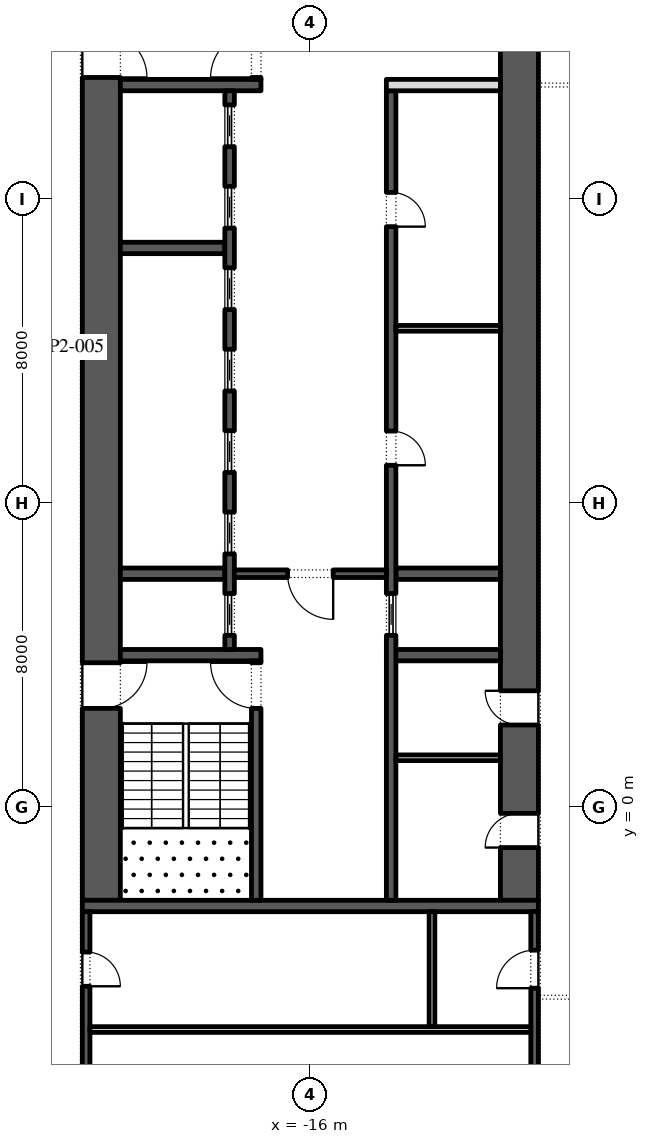
"""IFC4 building model, lengths in metres.
Left out: names, types, materials, properties, quantities, classifications, styles, units other than length and angle.
Written with IfcOpenShell. Run it as: python <this file> out.ifc"""

import sys

from ifc_helpers import new_model, si_unit, direction, frame, frame_2d, origin, place, context, subcontext, project, spatial, rectangle, extrude, element, fill, save


model = new_model("IFC4")
c1 = context("Model", 3, precision=1e-05, world=origin(), true_north=direction((0.0, 1.0)))
c2 = subcontext(c1, "Body", "Model", "MODEL_VIEW")
j1 = project(units=[si_unit("LENGTHUNIT", "METRE"), si_unit("PLANEANGLEUNIT", "RADIAN")], contexts=[c1])
p1 = place(None, origin())
s1 = spatial("IfcSite", under=j1, at=p1, CompositionType="ELEMENT")
p2 = place(p1, origin())
s2 = spatial("IfcBuilding", under=s1, at=p2, CompositionType="ELEMENT")
p3 = place(p2, frame((0.0, 0.0, 81.6)))
s3 = spatial("IfcBuildingStorey", under=s2, at=p3, CompositionType="ELEMENT", Elevation=81.6)
p4 = place(p3, frame((-21.5, -2.45, 0.0), z_axis=(0.0, 0.0, 1.0), x_axis=(0.0, 1.0, 0.0)))
e1 = element("IfcWall", 1, at=p4, inside=s3, PredefinedType="SHEAR", context=c2, shape_type="SweptSolid", body=[
    extrude(rectangle(XDim=27.9, YDim=1.0, at=frame_2d((13.95, 0.0))), origin(), (0.0, 0.0, 1.0), 4.0),
])
p5 = place(p4, frame((5.05, 0.0, 0.0)))
e2 = element("IfcOpeningElement", 2, at=p5, cuts=e1, PredefinedType="OPENING", context=c2, shape_type="SweptSolid", body=[
    extrude(rectangle(XDim=1.2, YDim=2.1, at=frame_2d((0.6, 1.05))), frame((0.0, 0.51, 0.0), z_axis=(0.0, -1.0, 0.0), x_axis=(1.0, 0.0, 0.0)), (0.0, 0.0, 1.0), 1.02),
])
p6 = place(p4, frame((21.65, 0.0, 0.0)))
e3 = element("IfcOpeningElement", 3, at=p6, cuts=e1, PredefinedType="OPENING", context=c2, shape_type="SweptSolid", body=[
    extrude(rectangle(XDim=1.2, YDim=2.1, at=frame_2d((0.6, 1.05))), frame((0.0, 0.51, 0.0), z_axis=(0.0, -1.0, 0.0), x_axis=(1.0, 0.0, 0.0)), (0.0, 0.0, 1.0), 1.02),
])
p7 = place(p3, frame((-10.5, -2.45, 0.0), z_axis=(0.0, 0.0, 1.0), x_axis=(0.0, 1.0, 0.0)))
e4 = element("IfcWall", 4, at=p7, inside=s3, PredefinedType="SHEAR", context=c2, shape_type="SweptSolid", body=[
    extrude(rectangle(XDim=27.9, YDim=1.0, at=frame_2d((13.95, 0.0))), origin(), (0.0, 0.0, 1.0), 4.0),
])
p8 = place(p7, frame((23.65, 0.0, 0.0)))
e5 = element("IfcOpeningElement", 5, at=p8, cuts=e4, PredefinedType="OPENING", context=c2, shape_type="SweptSolid", body=[
    extrude(rectangle(XDim=2.4, YDim=2.1, at=frame_2d((1.2, 1.05))), frame((0.0, 0.51, 0.0), z_axis=(0.0, -1.0, 0.0), x_axis=(1.0, 0.0, 0.0)), (0.0, 0.0, 1.0), 1.02),
])
p9 = place(p7, frame((1.387, 0.0, 0.0)))
e6 = element("IfcOpeningElement", 6, at=p9, cuts=e4, PredefinedType="OPENING", context=c2, shape_type="SweptSolid", body=[
    extrude(rectangle(XDim=0.9, YDim=2.1, at=frame_2d((0.45, 1.05))), frame((0.0, 0.51, 0.0), z_axis=(0.0, -1.0, 0.0), x_axis=(1.0, 0.0, 0.0)), (0.0, 0.0, 1.0), 1.02),
])
p10 = place(p7, frame((4.613, 0.0, 0.0)))
e7 = element("IfcOpeningElement", 7, at=p10, cuts=e4, PredefinedType="OPENING", context=c2, shape_type="SweptSolid", body=[
    extrude(rectangle(XDim=0.9, YDim=2.1, at=frame_2d((0.45, 1.05))), frame((0.0, 0.51, 0.0), z_axis=(0.0, -1.0, 0.0), x_axis=(1.0, 0.0, 0.0)), (0.0, 0.0, 1.0), 1.02),
])
p11 = place(p3, frame((-22.0, -2.6, 0.0), z_axis=(0.0, 0.0, 1.0), x_axis=(1.0, 0.0, 0.0)))
e8 = element("IfcWall", 8, at=p11, inside=s3, PredefinedType="SHEAR", context=c2, shape_type="SweptSolid", body=[
    extrude(rectangle(XDim=12.0, YDim=0.3, at=frame_2d((6.0, 0.0))), origin(), (0.0, 0.0, 1.0), 4.0),
])
p12 = place(p3, frame((-21.0, 4.0, 0.0), z_axis=(0.0, 0.0, 1.0), x_axis=(1.0, 0.0, 0.0)))
e9 = element("IfcWall", 9, at=p12, inside=s3, PredefinedType="SHEAR", context=c2, shape_type="SweptSolid", body=[
    extrude(rectangle(XDim=3.7, YDim=0.3, at=frame_2d((1.85, 0.0))), origin(), (0.0, 0.0, 1.0), 4.0),
])
p13 = place(p3, frame((-17.425, -2.45, 0.0), z_axis=(0.0, 0.0, 1.0), x_axis=(0.0, 1.0, 0.0)))
e10 = element("IfcWall", 10, at=p13, inside=s3, PredefinedType="SHEAR", context=c2, shape_type="SweptSolid", body=[
    extrude(rectangle(XDim=6.3, YDim=0.25, at=frame_2d((3.15, 0.0))), origin(), (0.0, 0.0, 1.0), 4.0),
])
p14 = place(p13, frame((5.05, 0.0, 0.0)))
e11 = element("IfcOpeningElement", 11, at=p14, cuts=e10, PredefinedType="OPENING", context=c2, shape_type="SweptSolid", body=[
    extrude(rectangle(XDim=1.2, YDim=2.1, at=frame_2d((0.6, 1.05))), frame((0.0, 0.135, 0.0), z_axis=(0.0, -1.0, 0.0), x_axis=(1.0, 0.0, 0.0)), (0.0, 0.0, 1.0), 0.27),
])
p15 = place(p3, frame((-21.0, 19.0, 0.0), z_axis=(0.0, 0.0, 1.0), x_axis=(1.0, 0.0, 0.0)))
e12 = element("IfcWall", 12, at=p15, inside=s3, PredefinedType="SHEAR", context=c2, shape_type="SweptSolid", body=[
    extrude(rectangle(XDim=3.7, YDim=0.3, at=frame_2d((1.85, 0.0))), origin(), (0.0, 0.0, 1.0), 4.0),
])
p16 = place(p3, frame((-17.425, 19.15, 0.0), z_axis=(0.0, 0.0, 1.0), x_axis=(0.0, 1.0, 0.0)))
e13 = element("IfcWall", 13, at=p16, inside=s3, PredefinedType="SHEAR", context=c2, shape_type="SweptSolid", body=[
    extrude(rectangle(XDim=6.3, YDim=0.25, at=frame_2d((3.15, 0.0))), origin(), (0.0, 0.0, 1.0), 4.0),
])
p17 = place(p16, frame((0.05, 0.0, 0.0)))
e14 = element("IfcOpeningElement", 14, at=p17, cuts=e13, PredefinedType="OPENING", context=c2, shape_type="SweptSolid", body=[
    extrude(rectangle(XDim=1.2, YDim=2.1, at=frame_2d((0.6, 1.05))), frame((0.0, 0.135, 0.0), z_axis=(0.0, -1.0, 0.0), x_axis=(1.0, 0.0, 0.0)), (0.0, 0.0, 1.0), 0.27),
])
for number, where, z_axis, x_axis in (
    (15, (-21.0, 6.143, 0.0), (0.0, 0.0, 1.0), (1.0, 0.0, 0.0)),
    (16, (-21.0, 14.714, 0.0), (0.0, 0.0, 1.0), (1.0, 0.0, 0.0)),
):
    element("IfcWall", number, at=place(p3, frame(where, z_axis=z_axis, x_axis=x_axis)), inside=s3, PredefinedType="SHEAR", context=c2, shape_type="SweptSolid", body=[
        extrude(rectangle(XDim=2.75, YDim=0.3, at=frame_2d((1.375, 0.0))), origin(), (0.0, 0.0, 1.0), 4.0),
    ])
p18 = place(p3, frame((-18.125, 4.15, 0.0), z_axis=(0.0, 0.0, 1.0), x_axis=(0.0, 1.0, 0.0)))
e17 = element("IfcWall", 17, at=p18, inside=s3, PredefinedType="SHEAR", context=c2, shape_type="SweptSolid", body=[
    extrude(rectangle(XDim=14.7, YDim=0.25, at=frame_2d((7.35, 0.0))), origin(), (0.0, 0.0, 1.0), 4.0),
])
p19 = place(p18, frame((0.371, 0.0, 0.0)))
e18 = element("IfcOpeningElement", 18, at=p19, cuts=e17, PredefinedType="OPENING", context=c2, shape_type="SweptSolid", body=[
    extrude(rectangle(XDim=1.1, YDim=2.1, at=frame_2d((0.55, 1.05))), frame((0.0, 0.135, 0.0), z_axis=(0.0, -1.0, 0.0), x_axis=(1.0, 0.0, 0.0)), (0.0, 0.0, 1.0), 0.27),
])
p20 = place(p18, frame((2.514, 0.0, 0.0)))
e19 = element("IfcOpeningElement", 19, at=p20, cuts=e17, PredefinedType="OPENING", context=c2, shape_type="SweptSolid", body=[
    extrude(rectangle(XDim=1.1, YDim=2.1, at=frame_2d((0.55, 1.05))), frame((0.0, 0.135, 0.0), z_axis=(0.0, -1.0, 0.0), x_axis=(1.0, 0.0, 0.0)), (0.0, 0.0, 1.0), 0.27),
])
p21 = place(p18, frame((4.657, 0.0, 0.0)))
e20 = element("IfcOpeningElement", 20, at=p21, cuts=e17, PredefinedType="OPENING", context=c2, shape_type="SweptSolid", body=[
    extrude(rectangle(XDim=1.1, YDim=2.1, at=frame_2d((0.55, 1.05))), frame((0.0, 0.135, 0.0), z_axis=(0.0, -1.0, 0.0), x_axis=(1.0, 0.0, 0.0)), (0.0, 0.0, 1.0), 0.27),
])
p22 = place(p18, frame((6.8, 0.0, 0.0)))
e21 = element("IfcOpeningElement", 21, at=p22, cuts=e17, PredefinedType="OPENING", context=c2, shape_type="SweptSolid", body=[
    extrude(rectangle(XDim=1.1, YDim=2.1, at=frame_2d((0.55, 1.05))), frame((0.0, 0.135, 0.0), z_axis=(0.0, -1.0, 0.0), x_axis=(1.0, 0.0, 0.0)), (0.0, 0.0, 1.0), 0.27),
])
p23 = place(p18, frame((8.943, 0.0, 0.0)))
e22 = element("IfcOpeningElement", 22, at=p23, cuts=e17, PredefinedType="OPENING", context=c2, shape_type="SweptSolid", body=[
    extrude(rectangle(XDim=1.1, YDim=2.1, at=frame_2d((0.55, 1.05))), frame((0.0, 0.135, 0.0), z_axis=(0.0, -1.0, 0.0), x_axis=(1.0, 0.0, 0.0)), (0.0, 0.0, 1.0), 0.27),
])
p24 = place(p18, frame((11.086, 0.0, 0.0)))
e23 = element("IfcOpeningElement", 23, at=p24, cuts=e17, PredefinedType="OPENING", context=c2, shape_type="SweptSolid", body=[
    extrude(rectangle(XDim=1.1, YDim=2.1, at=frame_2d((0.55, 1.05))), frame((0.0, 0.135, 0.0), z_axis=(0.0, -1.0, 0.0), x_axis=(1.0, 0.0, 0.0)), (0.0, 0.0, 1.0), 0.27),
])
p25 = place(p18, frame((13.229, 0.0, 0.0)))
e24 = element("IfcOpeningElement", 24, at=p25, cuts=e17, PredefinedType="OPENING", context=c2, shape_type="SweptSolid", body=[
    extrude(rectangle(XDim=1.1, YDim=2.1, at=frame_2d((0.55, 1.05))), frame((0.0, 0.135, 0.0), z_axis=(0.0, -1.0, 0.0), x_axis=(1.0, 0.0, 0.0)), (0.0, 0.0, 1.0), 0.27),
])
p26 = place(p3, frame((-14.0, 4.0, 0.0), z_axis=(0.0, 0.0, 1.0), x_axis=(1.0, 0.0, 0.0)))
e25 = element("IfcWall", 25, at=p26, inside=s3, PredefinedType="SHEAR", context=c2, shape_type="SweptSolid", body=[
    extrude(rectangle(XDim=3.0, YDim=0.3, at=frame_2d((1.5, 0.0))), origin(), (0.0, 0.0, 1.0), 4.0),
])
p27 = place(p3, frame((-13.75, 6.143, 0.0), z_axis=(0.0, 0.0, 1.0), x_axis=(1.0, 0.0, 0.0)))
e26 = element("IfcWall", 26, at=p27, inside=s3, PredefinedType="SHEAR", context=c2, shape_type="SweptSolid", body=[
    extrude(rectangle(XDim=2.75, YDim=0.3, at=frame_2d((1.375, 0.0))), origin(), (0.0, 0.0, 1.0), 4.0),
])
p28 = place(p3, frame((-13.875, -2.45, 0.0), z_axis=(0.0, 0.0, 1.0), x_axis=(0.0, 1.0, 0.0)))
e27 = element("IfcWall", 27, at=p28, inside=s3, PredefinedType="SHEAR", context=c2, shape_type="SweptSolid", body=[
    extrude(rectangle(XDim=21.3, YDim=0.25, at=frame_2d((10.65, 0.0))), origin(), (0.0, 0.0, 1.0), 4.0),
])
p29 = place(p28, frame((11.446, 0.0, 0.0)))
e28 = element("IfcOpeningElement", 28, at=p29, cuts=e27, PredefinedType="OPENING", context=c2, shape_type="SweptSolid", body=[
    extrude(rectangle(XDim=0.9, YDim=2.1, at=frame_2d((0.45, 1.05))), frame((0.0, 0.135, 0.0), z_axis=(0.0, -1.0, 0.0), x_axis=(1.0, 0.0, 0.0)), (0.0, 0.0, 1.0), 0.27),
])
p30 = place(p28, frame((17.725, 0.0, 0.0)))
e29 = element("IfcOpeningElement", 29, at=p30, cuts=e27, PredefinedType="OPENING", context=c2, shape_type="SweptSolid", body=[
    extrude(rectangle(XDim=0.9, YDim=2.1, at=frame_2d((0.45, 1.05))), frame((0.0, 0.135, 0.0), z_axis=(0.0, -1.0, 0.0), x_axis=(1.0, 0.0, 0.0)), (0.0, 0.0, 1.0), 0.27),
])
p31 = place(p28, frame((6.971, 0.0, 0.0)))
e30 = element("IfcOpeningElement", 30, at=p31, cuts=e27, PredefinedType="OPENING", context=c2, shape_type="SweptSolid", body=[
    extrude(rectangle(XDim=1.1, YDim=2.1, at=frame_2d((0.55, 1.05))), frame((0.0, 0.135, 0.0), z_axis=(0.0, -1.0, 0.0), x_axis=(1.0, 0.0, 0.0)), (0.0, 0.0, 1.0), 0.27),
])
p32 = place(p3, frame((-14.0, 19.0, 0.0), z_axis=(0.0, 0.0, 1.0), x_axis=(1.0, 0.0, 0.0)))
e31 = element("IfcWall", 31, at=p32, inside=s3, PredefinedType="PARTITIONING", context=c2, shape_type="SweptSolid", body=[
    extrude(rectangle(XDim=3.0, YDim=0.3, at=frame_2d((1.5, 0.0))), origin(), (0.0, 0.0, 1.0), 4.0),
])
p33 = place(p3, frame((-13.75, 12.6, 0.0), z_axis=(0.0, 0.0, 1.0), x_axis=(1.0, 0.0, 0.0)))
e32 = element("IfcWall", 32, at=p33, inside=s3, PredefinedType="PARTITIONING", context=c2, shape_type="SweptSolid", body=[
    extrude(rectangle(XDim=2.75, YDim=0.15, at=frame_2d((1.375, 0.0))), origin(), (0.0, 0.0, 1.0), 4.0),
])
p34 = place(p3, frame((-18.0, 6.143, 0.0), z_axis=(0.0, 0.0, 1.0), x_axis=(1.0, 0.0, 0.0)))
e33 = element("IfcWall", 33, at=p34, inside=s3, PredefinedType="SHEAR", context=c2, shape_type="SweptSolid", body=[
    extrude(rectangle(XDim=4.0, YDim=0.2, at=frame_2d((2.0, 0.0))), origin(), (0.0, 0.0, 1.0), 4.0),
])
p35 = place(p34, frame((1.4, 0.0, 0.0)))
e34 = element("IfcOpeningElement", 34, at=p35, cuts=e33, PredefinedType="OPENING", context=c2, shape_type="SweptSolid", body=[
    extrude(rectangle(XDim=1.2, YDim=2.1, at=frame_2d((0.6, 1.05))), frame((0.0, 0.11, 0.0), z_axis=(0.0, -1.0, 0.0), x_axis=(1.0, 0.0, 0.0)), (0.0, 0.0, 1.0), 0.22),
])
p36 = place(p3, frame((-13.75, 1.3, 0.0), z_axis=(0.0, 0.0, 1.0), x_axis=(1.0, 0.0, 0.0)))
e35 = element("IfcWall", 35, at=p36, inside=s3, PredefinedType="PARTITIONING", context=c2, shape_type="SweptSolid", body=[
    extrude(rectangle(XDim=2.75, YDim=0.15, at=frame_2d((1.375, 0.0))), origin(), (0.0, 0.0, 1.0), 4.0),
])
p37 = place(p3, frame((-21.9, -15.8, 0.0), z_axis=(0.0, 0.0, 1.0), x_axis=(0.0, 1.0, 0.0)))
e36 = element("IfcWall", 36, at=p37, inside=s3, PredefinedType="SHEAR", context=c2, shape_type="SweptSolid", body=[
    extrude(rectangle(XDim=13.05, YDim=0.2, at=frame_2d((6.525, 0.0))), origin(), (0.0, 0.0, 1.0), 4.0),
])
p38 = place(p37, frame((11.087, 0.0, 0.0)))
e37 = element("IfcOpeningElement", 37, at=p38, cuts=e36, PredefinedType="OPENING", context=c2, shape_type="SweptSolid", body=[
    extrude(rectangle(XDim=0.9, YDim=2.1, at=frame_2d((0.45, 1.05))), frame((0.0, 0.11, 0.0), z_axis=(0.0, -1.0, 0.0), x_axis=(1.0, 0.0, 0.0)), (0.0, 0.0, 1.0), 0.22),
])
p39 = place(p3, frame((-10.1, -15.8, 0.0), z_axis=(0.0, 0.0, 1.0), x_axis=(0.0, 1.0, 0.0)))
e38 = element("IfcWall", 38, at=p39, inside=s3, PredefinedType="SHEAR", context=c2, shape_type="SweptSolid", body=[
    extrude(rectangle(XDim=13.05, YDim=0.2, at=frame_2d((6.525, 0.0))), origin(), (0.0, 0.0, 1.0), 4.0),
])
p40 = place(p39, frame((4.488, 0.0, 0.0)))
e39 = element("IfcOpeningElement", 39, at=p40, cuts=e38, PredefinedType="OPENING", context=c2, shape_type="SweptSolid", body=[
    extrude(rectangle(XDim=0.9, YDim=2.1, at=frame_2d((0.45, 1.05))), frame((0.0, 0.11, 0.0), z_axis=(0.0, -1.0, 0.0), x_axis=(1.0, 0.0, 0.0)), (0.0, 0.0, 1.0), 0.22),
])
p41 = place(p39, frame((11.038, 0.0, 0.0)))
e40 = element("IfcOpeningElement", 40, at=p41, cuts=e38, PredefinedType="OPENING", context=c2, shape_type="SweptSolid", body=[
    extrude(rectangle(XDim=1.0, YDim=2.1, at=frame_2d((0.5, 1.05))), frame((0.0, 0.11, 0.0), z_axis=(0.0, -1.0, 0.0), x_axis=(1.0, 0.0, 0.0)), (0.0, 0.0, 1.0), 0.22),
])
p42 = place(p3, frame((-21.8, -5.85, 0.0), z_axis=(0.0, 0.0, 1.0), x_axis=(1.0, 0.0, 0.0)))
e41 = element("IfcWall", 41, at=p42, inside=s3, PredefinedType="PARTITIONING", context=c2, shape_type="SweptSolid", body=[
    extrude(rectangle(XDim=11.6, YDim=0.15, at=frame_2d((5.8, 0.0))), origin(), (0.0, 0.0, 1.0), 4.0),
])
p43 = place(p3, frame((-12.8, -5.775, 0.0), z_axis=(0.0, 0.0, 1.0), x_axis=(0.0, 1.0, 0.0)))
e42 = element("IfcWall", 42, at=p43, inside=s3, PredefinedType="PARTITIONING", context=c2, shape_type="SweptSolid", body=[
    extrude(rectangle(XDim=3.025, YDim=0.15, at=frame_2d((1.512, 0.0))), origin(), (0.0, 0.0, 1.0), 4.0),
])
p44 = place(p19, origin())
e43 = element("IfcDoor", 43, at=p44, inside=s3, OperationType="SLIDING_TO_LEFT", PredefinedType="DOOR", context=c2, shape_type="SweptSolid", body=[
    extrude(rectangle(XDim=1.1, YDim=2.1, at=frame_2d((0.55, 1.05))), frame((0.0, 0.025, 0.0), z_axis=(0.0, -1.0, 0.0), x_axis=(1.0, 0.0, 0.0)), (0.0, 0.0, 1.0), 0.05),
])
fill(e18, e43)
p45 = place(p20, origin())
e44 = element("IfcDoor", 44, at=p45, inside=s3, OperationType="SLIDING_TO_LEFT", PredefinedType="DOOR", context=c2, shape_type="SweptSolid", body=[
    extrude(rectangle(XDim=1.1, YDim=2.1, at=frame_2d((0.55, 1.05))), frame((0.0, 0.025, 0.0), z_axis=(0.0, -1.0, 0.0), x_axis=(1.0, 0.0, 0.0)), (0.0, 0.0, 1.0), 0.05),
])
fill(e19, e44)
p46 = place(p21, origin())
e45 = element("IfcDoor", 45, at=p46, inside=s3, OperationType="SLIDING_TO_LEFT", PredefinedType="DOOR", context=c2, shape_type="SweptSolid", body=[
    extrude(rectangle(XDim=1.1, YDim=2.1, at=frame_2d((0.55, 1.05))), frame((0.0, 0.025, 0.0), z_axis=(0.0, -1.0, 0.0), x_axis=(1.0, 0.0, 0.0)), (0.0, 0.0, 1.0), 0.05),
])
fill(e20, e45)
p47 = place(p22, origin())
e46 = element("IfcDoor", 46, at=p47, inside=s3, OperationType="SLIDING_TO_LEFT", PredefinedType="DOOR", context=c2, shape_type="SweptSolid", body=[
    extrude(rectangle(XDim=1.1, YDim=2.1, at=frame_2d((0.55, 1.05))), frame((0.0, 0.025, 0.0), z_axis=(0.0, -1.0, 0.0), x_axis=(1.0, 0.0, 0.0)), (0.0, 0.0, 1.0), 0.05),
])
fill(e21, e46)
p48 = place(p23, origin())
e47 = element("IfcDoor", 47, at=p48, inside=s3, OperationType="SLIDING_TO_LEFT", PredefinedType="DOOR", context=c2, shape_type="SweptSolid", body=[
    extrude(rectangle(XDim=1.1, YDim=2.1, at=frame_2d((0.55, 1.05))), frame((0.0, 0.025, 0.0), z_axis=(0.0, -1.0, 0.0), x_axis=(1.0, 0.0, 0.0)), (0.0, 0.0, 1.0), 0.05),
])
fill(e22, e47)
p49 = place(p24, origin())
e48 = element("IfcDoor", 48, at=p49, inside=s3, OperationType="SLIDING_TO_LEFT", PredefinedType="DOOR", context=c2, shape_type="SweptSolid", body=[
    extrude(rectangle(XDim=1.1, YDim=2.1, at=frame_2d((0.55, 1.05))), frame((0.0, 0.025, 0.0), z_axis=(0.0, -1.0, 0.0), x_axis=(1.0, 0.0, 0.0)), (0.0, 0.0, 1.0), 0.05),
])
fill(e23, e48)
p50 = place(p25, origin())
e49 = element("IfcDoor", 49, at=p50, inside=s3, OperationType="SLIDING_TO_LEFT", PredefinedType="DOOR", context=c2, shape_type="SweptSolid", body=[
    extrude(rectangle(XDim=1.1, YDim=2.1, at=frame_2d((0.55, 1.05))), frame((0.0, 0.025, 0.0), z_axis=(0.0, -1.0, 0.0), x_axis=(1.0, 0.0, 0.0)), (0.0, 0.0, 1.0), 0.05),
])
fill(e24, e49)
p51 = place(p29, frame((0.9, -0.2, 0.0), z_axis=(0.0, 0.0, 1.0), x_axis=(-1.0, 0.0, 0.0)))
e50 = element("IfcDoor", 50, at=p51, inside=s3, OperationType="SINGLE_SWING_LEFT", PredefinedType="DOOR", context=c2, shape_type="SweptSolid", body=[
    extrude(rectangle(XDim=0.9, YDim=2.1, at=frame_2d((0.45, 1.05))), frame((0.0, -0.075, 0.0), z_axis=(0.0, -1.0, 0.0), x_axis=(1.0, 0.0, 0.0)), (0.0, 0.0, 1.0), 0.05),
])
fill(e28, e50)
p52 = place(p30, frame((0.9, -0.2, 0.0), z_axis=(0.0, 0.0, 1.0), x_axis=(-1.0, 0.0, 0.0)))
e51 = element("IfcDoor", 51, at=p52, inside=s3, OperationType="SINGLE_SWING_LEFT", PredefinedType="DOOR", context=c2, shape_type="SweptSolid", body=[
    extrude(rectangle(XDim=0.9, YDim=2.1, at=frame_2d((0.45, 1.05))), frame((0.0, -0.075, 0.0), z_axis=(0.0, -1.0, 0.0), x_axis=(1.0, 0.0, 0.0)), (0.0, 0.0, 1.0), 0.05),
])
fill(e29, e51)
p53 = place(p31, origin())
e52 = element("IfcDoor", 52, at=p53, inside=s3, OperationType="SLIDING_TO_LEFT", PredefinedType="DOOR", context=c2, shape_type="SweptSolid", body=[
    extrude(rectangle(XDim=1.1, YDim=2.1, at=frame_2d((0.55, 1.05))), frame((0.0, 0.025, 0.0), z_axis=(0.0, -1.0, 0.0), x_axis=(1.0, 0.0, 0.0)), (0.0, 0.0, 1.0), 0.05),
])
fill(e30, e52)
p54 = place(p35, frame((1.2, 0.0, 0.0), z_axis=(0.0, 0.0, 1.0), x_axis=(-1.0, 0.0, 0.0)))
e53 = element("IfcDoor", 53, at=p54, inside=s3, OperationType="SINGLE_SWING_RIGHT", PredefinedType="DOOR", context=c2, shape_type="SweptSolid", body=[
    extrude(rectangle(XDim=1.2, YDim=2.1, at=frame_2d((0.6, 1.05))), frame((0.0, 0.025, 0.0), z_axis=(0.0, -1.0, 0.0), x_axis=(1.0, 0.0, 0.0)), (0.0, 0.0, 1.0), 0.05),
])
fill(e34, e53)
p55 = place(p14, origin())
e54 = element("IfcDoor", 54, at=p55, inside=s3, OperationType="SINGLE_SWING_LEFT", PredefinedType="DOOR", context=c2, shape_type="SweptSolid", body=[
    extrude(rectangle(XDim=1.2, YDim=2.1, at=frame_2d((0.6, 1.05))), frame((0.0, 0.025, 0.0), z_axis=(0.0, -1.0, 0.0), x_axis=(1.0, 0.0, 0.0)), (0.0, 0.0, 1.0), 0.05),
])
fill(e11, e54)
p56 = place(p5, frame((1.2, 0.0, 0.0), z_axis=(0.0, 0.0, 1.0), x_axis=(-1.0, 0.0, 0.0)))
e55 = element("IfcDoor", 55, at=p56, inside=s3, OperationType="SINGLE_SWING_RIGHT", PredefinedType="DOOR", context=c2, shape_type="SweptSolid", body=[
    extrude(rectangle(XDim=1.2, YDim=2.1, at=frame_2d((0.6, 1.05))), frame((0.0, 0.025, 0.0), z_axis=(0.0, -1.0, 0.0), x_axis=(1.0, 0.0, 0.0)), (0.0, 0.0, 1.0), 0.05),
])
fill(e2, e55)
p57 = place(p17, origin())
e56 = element("IfcDoor", 56, at=p57, inside=s3, OperationType="SINGLE_SWING_RIGHT", PredefinedType="DOOR", context=c2, shape_type="SweptSolid", body=[
    extrude(rectangle(XDim=1.2, YDim=2.1, at=frame_2d((0.6, 1.05))), frame((0.0, 0.025, 0.0), z_axis=(0.0, -1.0, 0.0), x_axis=(1.0, 0.0, 0.0)), (0.0, 0.0, 1.0), 0.05),
])
fill(e14, e56)
p58 = place(p6, frame((1.2, 0.0, 0.0), z_axis=(0.0, 0.0, 1.0), x_axis=(-1.0, 0.0, 0.0)))
e57 = element("IfcDoor", 57, at=p58, inside=s3, OperationType="SINGLE_SWING_LEFT", PredefinedType="DOOR", context=c2, shape_type="SweptSolid", body=[
    extrude(rectangle(XDim=1.2, YDim=2.1, at=frame_2d((0.6, 1.05))), frame((0.0, 0.025, 0.0), z_axis=(0.0, -1.0, 0.0), x_axis=(1.0, 0.0, 0.0)), (0.0, 0.0, 1.0), 0.05),
])
fill(e3, e57)
p59 = place(p9, origin())
e58 = element("IfcDoor", 58, at=p59, inside=s3, OperationType="SINGLE_SWING_RIGHT", PredefinedType="DOOR", context=c2, shape_type="SweptSolid", body=[
    extrude(rectangle(XDim=0.9, YDim=2.1, at=frame_2d((0.45, 1.05))), frame((0.0, 0.5, 0.0), z_axis=(0.0, -1.0, 0.0), x_axis=(1.0, 0.0, 0.0)), (0.0, 0.0, 1.0), 0.05),
])
fill(e6, e58)
p60 = place(p10, origin())
e59 = element("IfcDoor", 59, at=p60, inside=s3, OperationType="SINGLE_SWING_LEFT", PredefinedType="DOOR", context=c2, shape_type="SweptSolid", body=[
    extrude(rectangle(XDim=0.9, YDim=2.1, at=frame_2d((0.45, 1.05))), frame((0.0, 0.5, 0.0), z_axis=(0.0, -1.0, 0.0), x_axis=(1.0, 0.0, 0.0)), (0.0, 0.0, 1.0), 0.05),
])
fill(e7, e59)
p61 = place(p41, origin())
e60 = element("IfcDoor", 60, at=p61, inside=s3, OperationType="SINGLE_SWING_RIGHT", PredefinedType="DOOR", context=c2, shape_type="SweptSolid", body=[
    extrude(rectangle(XDim=1.0, YDim=2.1, at=frame_2d((0.5, 1.05))), frame((0.0, 0.1, 0.0), z_axis=(0.0, -1.0, 0.0), x_axis=(1.0, 0.0, 0.0)), (0.0, 0.0, 1.0), 0.05),
])
fill(e40, e60)
p62 = place(p38, frame((0.9, -0.15, 0.0), z_axis=(0.0, 0.0, 1.0), x_axis=(-1.0, 0.0, 0.0)))
e61 = element("IfcDoor", 61, at=p62, inside=s3, OperationType="SINGLE_SWING_LEFT", PredefinedType="DOOR", context=c2, shape_type="SweptSolid", body=[
    extrude(rectangle(XDim=0.9, YDim=2.1, at=frame_2d((0.45, 1.05))), frame((0.0, -0.05, 0.0), z_axis=(0.0, -1.0, 0.0), x_axis=(1.0, 0.0, 0.0)), (0.0, 0.0, 1.0), 0.05),
])
fill(e37, e61)
save(model, sys.argv[1])
